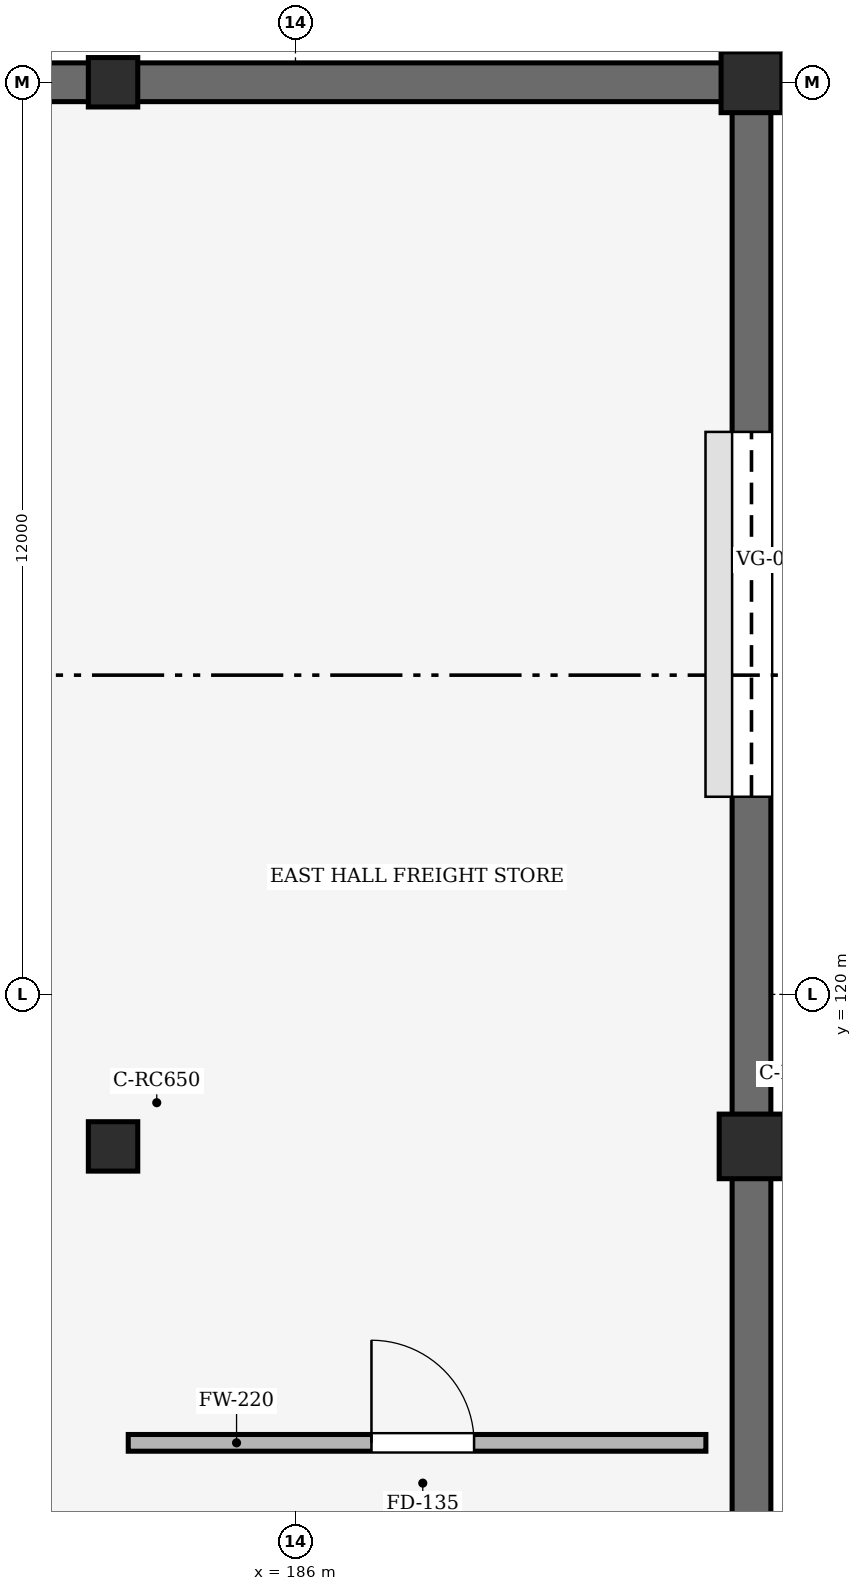
"""IFC4 building model, lengths in metres.
Left out: names, types, materials, properties, quantities, classifications, styles, units other than length and angle.
Written with IfcOpenShell. Run it as: python <this file> out.ifc"""

import sys

from ifc_helpers import new_model, si_unit, direction, frame, frame_2d, origin, origin_2d, place, context, subcontext, project, spatial, rectangle, extrude, element, fill, save


model = new_model("IFC4")
c1 = context("Model", 3, precision=1e-05, world=origin(), true_north=direction((0.0, 1.0)))
c2 = subcontext(c1, "Body", "Model", "MODEL_VIEW")
j1 = project(units=[si_unit("LENGTHUNIT", "METRE"), si_unit("PLANEANGLEUNIT", "RADIAN")], contexts=[c1])
p1 = place(None, origin())
s1 = spatial("IfcSite", under=j1, at=p1, CompositionType="ELEMENT")
p2 = place(p1, origin())
s2 = spatial("IfcBuilding", under=s1, at=p2, CompositionType="ELEMENT")
p3 = place(p2, origin())
s3 = spatial("IfcBuildingStorey", under=s2, at=p3, CompositionType="ELEMENT", Elevation=0.0)
p4 = place(p3, frame((192.0, 118.0, -0.44), z_axis=(0.0, 0.0, 1.0), x_axis=(1.0, 0.0, 0.0)))
e1 = element("IfcColumn", 1, at=p4, inside=s3, PredefinedType="COLUMN", context=c2, shape_type="SweptSolid", body=[
    extrude(rectangle(XDim=0.85, YDim=0.85, at=origin_2d()), origin(), (0.0, 0.0, 1.0), 5.84),
])
p5 = place(p3, frame((183.6, 118.0, -0.44), z_axis=(0.0, 0.0, 1.0), x_axis=(1.0, 0.0, 0.0)))
e2 = element("IfcColumn", 2, at=p5, inside=s3, PredefinedType="COLUMN", context=c2, shape_type="SweptSolid", body=[
    extrude(rectangle(XDim=0.65, YDim=0.65, at=origin_2d()), origin(), (0.0, 0.0, 1.0), 5.84),
])
p6 = place(p3, frame((192.0, 132.0, -0.44), z_axis=(0.0, 0.0, 1.0), x_axis=(1.0, 0.0, 0.0)))
e3 = element("IfcColumn", 3, at=p6, inside=s3, PredefinedType="COLUMN", context=c2, shape_type="SweptSolid", body=[
    extrude(rectangle(XDim=0.8, YDim=0.8, at=origin_2d()), origin(), (0.0, 0.0, 1.0), 5.84),
])
p7 = place(p3, frame((183.6, 132.0, -0.44), z_axis=(0.0, 0.0, 1.0), x_axis=(1.0, 0.0, 0.0)))
e4 = element("IfcColumn", 4, at=p7, inside=s3, PredefinedType="COLUMN", context=c2, shape_type="SweptSolid", body=[
    extrude(rectangle(XDim=0.65, YDim=0.65, at=origin_2d()), origin(), (0.0, 0.0, 1.0), 5.84),
])
p8 = place(p3, frame((192.0, 104.0, 0.0), z_axis=(0.0, 0.0, 1.0), x_axis=(0.0, 1.0, 0.0)))
e5 = element("IfcWall", 5, at=p8, inside=s3, PredefinedType="SOLIDWALL", context=c2, shape_type="SweptSolid", body=[
    extrude(rectangle(XDim=14.0, YDim=0.51, at=frame_2d((7.0, 0.0))), origin(), (0.0, 0.0, 1.0), 4.95),
])
p9 = place(p8, frame((5.45, 0.0, 3.2)))
e6 = element("IfcOpeningElement", 6, at=p9, cuts=e5, PredefinedType="OPENING", context=c2, shape_type="SweptSolid", body=[
    extrude(rectangle(XDim=3.1, YDim=1.15, at=frame_2d((1.55, 0.575))), frame((0.0, 0.265, 0.0), z_axis=(0.0, -1.0, 0.0), x_axis=(1.0, 0.0, 0.0)), (0.0, 0.0, 1.0), 0.53),
])
p10 = place(p3, frame((192.0, 118.0, 0.0), z_axis=(0.0, 0.0, 1.0), x_axis=(0.0, 1.0, 0.0)))
e7 = element("IfcWall", 7, at=p10, inside=s3, PredefinedType="SOLIDWALL", context=c2, shape_type="SweptSolid", body=[
    extrude(rectangle(XDim=14.0, YDim=0.51, at=frame_2d((7.0, 0.0))), origin(), (0.0, 0.0, 1.0), 4.95),
])
p11 = place(p10, frame((4.6, 0.0, 0.0)))
e8 = element("IfcOpeningElement", 8, at=p11, cuts=e7, PredefinedType="OPENING", context=c2, shape_type="SweptSolid", body=[
    extrude(rectangle(XDim=4.8, YDim=4.4, at=frame_2d((2.4, 2.2))), frame((0.0, 0.265, 0.0), z_axis=(0.0, -1.0, 0.0), x_axis=(1.0, 0.0, 0.0)), (0.0, 0.0, 1.0), 0.53),
])
p12 = place(p3, frame((183.6, 132.0, 0.0), z_axis=(0.0, 0.0, 1.0), x_axis=(-1.0, 0.0, 0.0)))
e9 = element("IfcWall", 9, at=p12, inside=s3, PredefinedType="SOLIDWALL", context=c2, shape_type="SweptSolid", body=[
    extrude(rectangle(XDim=35.2, YDim=0.51, at=frame_2d((17.6, 0.0))), origin(), (0.0, 0.0, 1.0), 4.95),
])
p13 = place(p12, frame((8.0, 0.0, 0.0)))
e10 = element("IfcOpeningElement", 10, at=p13, cuts=e9, PredefinedType="OPENING", context=c2, shape_type="SweptSolid", body=[
    extrude(rectangle(XDim=2.3, YDim=2.55, at=frame_2d((1.15, 1.275))), frame((0.0, 0.265, 0.0), z_axis=(0.0, -1.0, 0.0), x_axis=(1.0, 0.0, 0.0)), (0.0, 0.0, 1.0), 0.53),
])
p14 = place(p12, frame((18.4, 0.0, 0.0)))
e11 = element("IfcOpeningElement", 11, at=p14, cuts=e9, PredefinedType="OPENING", context=c2, shape_type="SweptSolid", body=[
    extrude(rectangle(XDim=2.0, YDim=2.4, at=frame_2d((1.0, 1.2))), frame((0.0, 0.265, 0.0), z_axis=(0.0, -1.0, 0.0), x_axis=(1.0, 0.0, 0.0)), (0.0, 0.0, 1.0), 0.53),
])
p15 = place(p3, frame((192.0, 132.0, 0.0), z_axis=(0.0, 0.0, 1.0), x_axis=(-1.0, 0.0, 0.0)))
e12 = element("IfcWall", 12, at=p15, inside=s3, PredefinedType="SOLIDWALL", context=c2, shape_type="SweptSolid", body=[
    extrude(rectangle(XDim=8.4, YDim=0.51, at=frame_2d((4.2, 0.0))), origin(), (0.0, 0.0, 1.0), 4.95),
])
p16 = place(p3, frame((183.8, 114.1, 0.0), z_axis=(0.0, 0.0, 1.0), x_axis=(1.0, 0.0, 0.0)))
e13 = element("IfcWall", 13, at=p16, inside=s3, PredefinedType="SOLIDWALL", context=c2, shape_type="SweptSolid", body=[
    extrude(rectangle(XDim=7.6, YDim=0.22, at=frame_2d((3.8, 0.0))), origin(), (0.0, 0.0, 1.0), 4.1),
])
p17 = place(p16, frame((3.2, 0.0, 0.0)))
e14 = element("IfcOpeningElement", 14, at=p17, cuts=e13, PredefinedType="OPENING", context=c2, shape_type="SweptSolid", body=[
    extrude(rectangle(XDim=1.35, YDim=2.2, at=frame_2d((0.675, 1.1))), frame((0.0, 0.12, 0.0), z_axis=(0.0, -1.0, 0.0), x_axis=(1.0, 0.0, 0.0)), (0.0, 0.0, 1.0), 0.24),
])
p18 = place(p11, origin())
e15 = element("IfcDoor", 15, at=p18, inside=s3, OperationType="ROLLINGUP", PredefinedType="GATE", context=c2, shape_type="SweptSolid", body=[
    extrude(rectangle(XDim=4.8, YDim=4.4, at=frame_2d((2.4, 2.2))), frame((0.0, 0.025, 0.0), z_axis=(0.0, -1.0, 0.0), x_axis=(1.0, 0.0, 0.0)), (0.0, 0.0, 1.0), 0.05),
])
fill(e8, e15)
p19 = place(p17, origin())
e16 = element("IfcDoor", 16, at=p19, inside=s3, OperationType="SINGLE_SWING_LEFT", PredefinedType="DOOR", context=c2, shape_type="SweptSolid", body=[
    extrude(rectangle(XDim=1.35, YDim=2.2, at=frame_2d((0.675, 1.1))), frame((0.0, 0.025, 0.0), z_axis=(0.0, -1.0, 0.0), x_axis=(1.0, 0.0, 0.0)), (0.0, 0.0, 1.0), 0.05),
])
fill(e14, e16)
save(model, sys.argv[1])
